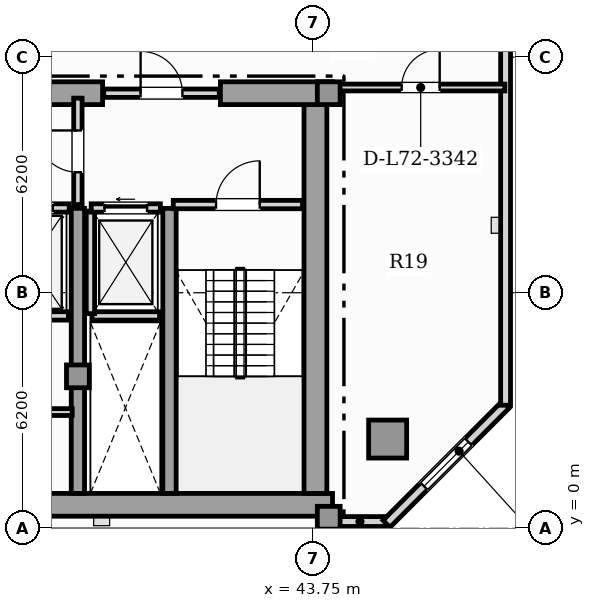
"""IFC4 building model, lengths in metres.
Left out: names, types, materials, properties, quantities, classifications, styles, units other than length and angle.
Written with IfcOpenShell. Run it as: python <this file> out.ifc"""

import sys

from ifc_helpers import new_model, si_unit, direction, frame, frame_2d, origin, origin_2d, place, context, subcontext, project, spatial, rectangle, hollow_rectangle, extrude, element, fill, save


model = new_model("IFC4")
c1 = context("Model", 3, precision=1e-05, world=origin(), true_north=direction((0.0, 1.0)))
c2 = subcontext(c1, "Body", "Model", "MODEL_VIEW")
j1 = project(units=[si_unit("LENGTHUNIT", "METRE"), si_unit("PLANEANGLEUNIT", "RADIAN")], contexts=[c1])
p1 = place(None, origin())
s1 = spatial("IfcSite", under=j1, at=p1, CompositionType="ELEMENT")
p2 = place(p1, origin())
s2 = spatial("IfcBuilding", under=s1, at=p2, CompositionType="ELEMENT")
p3 = place(p2, frame((0.0, 0.0, 292.6)))
s3 = spatial("IfcBuildingStorey", under=s2, at=p3, CompositionType="ELEMENT", Elevation=292.6)
p4 = place(p3, frame((13.25, 0.62, 0.0), z_axis=(0.0, 0.0, 1.0), x_axis=(1.0, 0.0, 0.0)))
e1 = element("IfcWall", 1, at=p4, inside=s3, PredefinedType="SHEAR", context=c2, shape_type="SweptSolid", body=[
    extrude(rectangle(XDim=31.0, YDim=0.6, at=frame_2d((15.5, 0.0))), origin(), (0.0, 0.0, 1.0), 3.65),
])
p5 = place(p3, frame((43.8, 0.92, 0.0), z_axis=(0.0, 0.0, 1.0), x_axis=(0.0, 1.0, 0.0)))
e2 = element("IfcWall", 2, at=p5, inside=s3, PredefinedType="SHEAR", context=c2, shape_type="SweptSolid", body=[
    extrude(rectangle(XDim=10.53, YDim=0.6, at=frame_2d((5.265, 0.0))), origin(), (0.0, 0.0, 1.0), 3.65),
])
p6 = place(p3, frame((30.9, 11.45, 0.0), z_axis=(0.0, 0.0, 1.0), x_axis=(1.0, 0.0, 0.0)))
e3 = element("IfcWall", 3, at=p6, inside=s3, PredefinedType="SHEAR", context=c2, shape_type="SweptSolid", body=[
    extrude(rectangle(XDim=7.3, YDim=0.6, at=frame_2d((3.65, 0.0))), origin(), (0.0, 0.0, 1.0), 3.65),
])
p7 = place(p3, frame((41.3, 11.45, 0.0), z_axis=(0.0, 0.0, 1.0), x_axis=(1.0, 0.0, 0.0)))
e4 = element("IfcWall", 4, at=p7, inside=s3, PredefinedType="SHEAR", context=c2, shape_type="SweptSolid", body=[
    extrude(rectangle(XDim=2.95, YDim=0.6, at=frame_2d((1.475, 0.0))), origin(), (0.0, 0.0, 1.0), 3.65),
])
for number, where, z_axis, x_axis in (
    (5, (37.55, 0.92, 0.0), (0.0, 0.0, 1.0), (0.0, 1.0, 0.0)),
    (6, (39.96, 0.92, 0.0), (0.0, 0.0, 1.0), (0.0, 1.0, 0.0)),
):
    element("IfcWall", number, at=place(p3, frame(where, z_axis=z_axis, x_axis=x_axis)), inside=s3, PredefinedType="SHEAR", context=c2, shape_type="SweptSolid", body=[
        extrude(rectangle(XDim=7.5, YDim=0.35, at=frame_2d((3.75, 0.0))), origin(), (0.0, 0.0, 1.0), 3.65),
    ])
for number, where, z_axis, x_axis in (
    (7, (44.15, 0.28, 0.0), (0.0, 0.0, 1.0), (1.0, 0.0, 0.0)),
    (8, (44.15, 11.45, 0.0), (0.0, 0.0, 1.0), (1.0, 0.0, 0.0)),
    (9, (37.55, 4.0, 0.0), (0.0, 0.0, 1.0), (1.0, 0.0, 0.0)),
):
    element("IfcColumn", number, at=place(p3, frame(where, z_axis=z_axis, x_axis=x_axis)), inside=s3, PredefinedType="COLUMN", context=c2, shape_type="SweptSolid", body=[
        extrude(rectangle(XDim=0.6, YDim=0.6, at=origin_2d()), origin(), (0.0, 0.0, 1.0), 3.85),
    ])
p8 = place(p3, frame((45.7, 2.35, 0.0), z_axis=(0.0, 0.0, 1.0), x_axis=(1.0, 0.0, 0.0)))
e10 = element("IfcColumn", 10, at=p8, inside=s3, PredefinedType="USERDEFINED", context=c2, shape_type="SweptSolid", body=[
    extrude(hollow_rectangle(XDim=1.0, YDim=1.0, WallThickness=0.06, at=origin_2d()), origin(), (0.0, 0.0, 1.0), 3.85),
])
p9 = place(p3, frame((44.25, 0.18, 0.0), z_axis=(0.0, 0.0, 1.0), x_axis=(1.0, 0.0, 0.0)))
e11 = element("IfcWall", 11, at=p9, inside=s3, PredefinedType="SOLIDWALL", context=c2, shape_type="SweptSolid", body=[
    extrude(rectangle(XDim=1.444, YDim=0.26, at=frame_2d((0.722, 0.0))), origin(), (0.0, 0.0, 1.0), 3.65),
])
p10 = place(p3, frame((45.67, 0.12, 0.0), z_axis=(0.0, 0.0, 1.0), x_axis=(0.707106781187, 0.707106781187, 0.0)))
e12 = element("IfcWall", 12, at=p10, inside=s3, PredefinedType="SOLIDWALL", context=c2, shape_type="SweptSolid", body=[
    extrude(rectangle(XDim=4.446, YDim=0.26, at=frame_2d((2.223, 0.0))), origin(), (0.0, 0.0, 1.0), 3.65),
])
p11 = place(p10, frame((1.398, 0.0, 0.88)))
e13 = element("IfcOpeningElement", 13, at=p11, cuts=e12, PredefinedType="OPENING", context=c2, shape_type="SweptSolid", body=[
    extrude(rectangle(XDim=1.65, YDim=2.0, at=frame_2d((0.825, 1.0))), frame((0.0, 0.14, 0.0), z_axis=(0.0, -1.0, 0.0), x_axis=(1.0, 0.0, 0.0)), (0.0, 0.0, 1.0), 0.28),
])
p12 = place(p3, frame((48.804, 3.24, 0.0), z_axis=(0.0, 0.0, 1.0), x_axis=(0.0, 1.0, 0.0)))
e14 = element("IfcWall", 14, at=p12, inside=s3, PredefinedType="SOLIDWALL", context=c2, shape_type="SweptSolid", body=[
    extrude(rectangle(XDim=13.478, YDim=0.26, at=frame_2d((6.739, 0.0))), origin(), (0.0, 0.0, 1.0), 3.65),
])
p13 = place(p12, frame((10.919, 0.0, 0.95)))
e15 = element("IfcOpeningElement", 15, at=p13, cuts=e14, PredefinedType="OPENING", context=c2, shape_type="SweptSolid", body=[
    extrude(rectangle(XDim=0.9, YDim=1.5, at=frame_2d((0.45, 0.75))), frame((0.0, 0.14, 0.0), z_axis=(0.0, -1.0, 0.0), x_axis=(1.0, 0.0, 0.0)), (0.0, 0.0, 1.0), 0.28),
])
p14 = place(p3, frame((37.92, 5.59, 0.0), z_axis=(0.0, 0.0, 1.0), x_axis=(1.0, 0.0, 0.0)))
e16 = element("IfcWall", 16, at=p14, inside=s3, PredefinedType="SOLIDWALL", context=c2, shape_type="SweptSolid", body=[
    extrude(rectangle(XDim=1.78, YDim=0.22, at=frame_2d((0.89, 0.0))), origin(), (0.0, 0.0, 1.0), 3.65),
])
p15 = place(p3, frame((37.88, 5.65, 0.0), z_axis=(0.0, 0.0, 1.0), x_axis=(0.0, 1.0, 0.0)))
e17 = element("IfcWall", 17, at=p15, inside=s3, PredefinedType="SOLIDWALL", context=c2, shape_type="SweptSolid", body=[
    extrude(rectangle(XDim=2.7, YDim=0.22, at=frame_2d((1.35, 0.0))), origin(), (0.0, 0.0, 1.0), 3.65),
])
p16 = place(p3, frame((37.9, 8.43, 0.0), z_axis=(0.0, 0.0, 1.0), x_axis=(1.0, 0.0, 0.0)))
e18 = element("IfcWall", 18, at=p16, inside=s3, PredefinedType="SOLIDWALL", context=c2, shape_type="SweptSolid", body=[
    extrude(rectangle(XDim=1.82, YDim=0.22, at=frame_2d((0.91, 0.0))), origin(), (0.0, 0.0, 1.0), 3.65),
])
p17 = place(p16, frame((0.35, 0.0, 0.0)))
e19 = element("IfcOpeningElement", 19, at=p17, cuts=e18, PredefinedType="OPENING", context=c2, shape_type="SweptSolid", body=[
    extrude(rectangle(XDim=1.12, YDim=2.25, at=frame_2d((0.56, 1.125))), frame((0.0, 0.12, 0.0), z_axis=(0.0, -1.0, 0.0), x_axis=(1.0, 0.0, 0.0)), (0.0, 0.0, 1.0), 0.24),
])
p18 = place(p3, frame((35.3, 5.59, 0.0), z_axis=(0.0, 0.0, 1.0), x_axis=(1.0, 0.0, 0.0)))
e20 = element("IfcWall", 20, at=p18, inside=s3, PredefinedType="SOLIDWALL", context=c2, shape_type="SweptSolid", body=[
    extrude(rectangle(XDim=2.0, YDim=0.22, at=frame_2d((1.0, 0.0))), origin(), (0.0, 0.0, 1.0), 3.65),
])
p19 = place(p3, frame((35.28, 8.43, 0.0), z_axis=(0.0, 0.0, 1.0), x_axis=(1.0, 0.0, 0.0)))
e21 = element("IfcWall", 21, at=p19, inside=s3, PredefinedType="SOLIDWALL", context=c2, shape_type="SweptSolid", body=[
    extrude(rectangle(XDim=2.04, YDim=0.22, at=frame_2d((1.02, 0.0))), origin(), (0.0, 0.0, 1.0), 3.65),
])
p20 = place(p19, frame((0.43, 0.0, 0.0)))
e22 = element("IfcOpeningElement", 22, at=p20, cuts=e21, PredefinedType="OPENING", context=c2, shape_type="SweptSolid", body=[
    extrude(rectangle(XDim=1.18, YDim=2.2, at=frame_2d((0.59, 1.1))), frame((0.0, 0.12, 0.0), z_axis=(0.0, -1.0, 0.0), x_axis=(1.0, 0.0, 0.0)), (0.0, 0.0, 1.0), 0.24),
])
p21 = place(p3, frame((40.06, 8.52, 0.0), z_axis=(0.0, 0.0, 1.0), x_axis=(1.0, 0.0, 0.0)))
e23 = element("IfcWall", 23, at=p21, inside=s3, PredefinedType="SOLIDWALL", context=c2, shape_type="SweptSolid", body=[
    extrude(rectangle(XDim=3.4, YDim=0.22, at=frame_2d((1.7, 0.0))), origin(), (0.0, 0.0, 1.0), 3.65),
])
p22 = place(p21, frame((1.125, 0.0, 0.0)))
e24 = element("IfcOpeningElement", 24, at=p22, cuts=e23, PredefinedType="OPENING", context=c2, shape_type="SweptSolid", body=[
    extrude(rectangle(XDim=1.15, YDim=2.2, at=frame_2d((0.575, 1.1))), frame((0.0, 0.12, 0.0), z_axis=(0.0, -1.0, 0.0), x_axis=(1.0, 0.0, 0.0)), (0.0, 0.0, 1.0), 0.24),
])
p23 = place(p3, frame((37.55, 8.52, 0.0), z_axis=(0.0, 0.0, 1.0), x_axis=(0.0, 1.0, 0.0)))
e25 = element("IfcWall", 25, at=p23, inside=s3, PredefinedType="SOLIDWALL", context=c2, shape_type="SweptSolid", body=[
    extrude(rectangle(XDim=2.8, YDim=0.22, at=frame_2d((1.4, 0.0))), origin(), (0.0, 0.0, 1.0), 3.105),
])
p24 = place(p23, frame((0.85, 0.0, 0.0)))
e26 = element("IfcOpeningElement", 26, at=p24, cuts=e25, PredefinedType="OPENING", context=c2, shape_type="SweptSolid", body=[
    extrude(rectangle(XDim=1.1, YDim=2.2, at=frame_2d((0.55, 1.1))), frame((0.0, 0.12, 0.0), z_axis=(0.0, -1.0, 0.0), x_axis=(1.0, 0.0, 0.0)), (0.0, 0.0, 1.0), 0.24),
])
p25 = place(p3, frame((38.23, 11.45, 0.0), z_axis=(0.0, 0.0, 1.0), x_axis=(1.0, 0.0, 0.0)))
e27 = element("IfcWall", 27, at=p25, inside=s3, PredefinedType="SOLIDWALL", context=c2, shape_type="SweptSolid", body=[
    extrude(rectangle(XDim=3.04, YDim=0.22, at=frame_2d((1.52, 0.0))), origin(), (0.0, 0.0, 1.0), 3.65),
])
p26 = place(p25, frame((0.97, 0.0, 0.0)))
e28 = element("IfcOpeningElement", 28, at=p26, cuts=e27, PredefinedType="OPENING", context=c2, shape_type="SweptSolid", body=[
    extrude(rectangle(XDim=1.1, YDim=2.2, at=frame_2d((0.55, 1.1))), frame((0.0, 0.12, 0.0), z_axis=(0.0, -1.0, 0.0), x_axis=(1.0, 0.0, 0.0)), (0.0, 0.0, 1.0), 0.24),
])
p27 = place(p3, frame((32.22, 3.06, 0.0), z_axis=(0.0, 0.0, 1.0), x_axis=(1.0, 0.0, 0.0)))
e29 = element("IfcWall", 29, at=p27, inside=s3, PredefinedType="PARTITIONING", context=c2, shape_type="SweptSolid", body=[
    extrude(rectangle(XDim=5.18, YDim=0.18, at=frame_2d((2.59, 0.0))), origin(), (0.0, 0.0, 1.0), 3.65),
])
p28 = place(p3, frame((44.355, 11.6, 0.0), z_axis=(0.0, 0.0, 1.0), x_axis=(1.0, 0.0, 0.0)))
e30 = element("IfcWall", 30, at=p28, inside=s3, PredefinedType="PARTITIONING", context=c2, shape_type="SweptSolid", body=[
    extrude(rectangle(XDim=4.429, YDim=0.18, at=frame_2d((2.215, 0.0))), origin(), (0.0, 0.0, 1.0), 3.65),
])
p29 = place(p28, frame((1.715, 0.0, 0.0)))
e31 = element("IfcOpeningElement", 31, at=p29, cuts=e30, PredefinedType="OPENING", context=c2, shape_type="SweptSolid", body=[
    extrude(rectangle(XDim=1.0, YDim=2.15, at=frame_2d((0.5, 1.075))), frame((0.0, 0.1, 0.0), z_axis=(0.0, -1.0, 0.0), x_axis=(1.0, 0.0, 0.0)), (0.0, 0.0, 1.0), 0.2),
])
p30 = place(p11, origin())
e32 = element("IfcWindow", 32, at=p30, inside=s3, PartitioningType="SINGLE_PANEL", PredefinedType="WINDOW", context=c2, shape_type="SweptSolid", body=[
    extrude(rectangle(XDim=1.65, YDim=2.0, at=frame_2d((0.825, 1.0))), frame((0.0, 0.03, 0.0), z_axis=(0.0, -1.0, 0.0), x_axis=(1.0, 0.0, 0.0)), (0.0, 0.0, 1.0), 0.06),
])
fill(e13, e32)
p31 = place(p17, origin())
e33 = element("IfcDoor", 33, at=p31, inside=s3, OperationType="SLIDING_TO_LEFT", PredefinedType="DOOR", context=c2, shape_type="SweptSolid", body=[
    extrude(rectangle(XDim=1.12, YDim=2.25, at=frame_2d((0.56, 1.125))), frame((0.0, 0.025, 0.0), z_axis=(0.0, -1.0, 0.0), x_axis=(1.0, 0.0, 0.0)), (0.0, 0.0, 1.0), 0.05),
])
fill(e19, e33)
p32 = place(p20, origin())
e34 = element("IfcDoor", 34, at=p32, inside=s3, OperationType="SLIDING_TO_RIGHT", PredefinedType="DOOR", context=c2, shape_type="SweptSolid", body=[
    extrude(rectangle(XDim=1.18, YDim=2.2, at=frame_2d((0.59, 1.1))), frame((0.0, 0.025, 0.0), z_axis=(0.0, -1.0, 0.0), x_axis=(1.0, 0.0, 0.0)), (0.0, 0.0, 1.0), 0.05),
])
fill(e22, e34)
p33 = place(p22, origin())
e35 = element("IfcDoor", 35, at=p33, inside=s3, OperationType="SINGLE_SWING_RIGHT", PredefinedType="DOOR", context=c2, shape_type="SweptSolid", body=[
    extrude(rectangle(XDim=1.15, YDim=2.2, at=frame_2d((0.575, 1.1))), frame((0.0, 0.025, 0.0), z_axis=(0.0, -1.0, 0.0), x_axis=(1.0, 0.0, 0.0)), (0.0, 0.0, 1.0), 0.05),
])
fill(e24, e35)
p34 = place(p24, origin())
e36 = element("IfcDoor", 36, at=p34, inside=s3, OperationType="SINGLE_SWING_RIGHT", PredefinedType="DOOR", context=c2, shape_type="SweptSolid", body=[
    extrude(rectangle(XDim=1.1, YDim=2.2, at=frame_2d((0.55, 1.1))), frame((0.0, 0.025, 0.0), z_axis=(0.0, -1.0, 0.0), x_axis=(1.0, 0.0, 0.0)), (0.0, 0.0, 1.0), 0.05),
])
fill(e26, e36)
p35 = place(p26, origin())
e37 = element("IfcDoor", 37, at=p35, inside=s3, OperationType="SINGLE_SWING_LEFT", PredefinedType="DOOR", context=c2, shape_type="SweptSolid", body=[
    extrude(rectangle(XDim=1.1, YDim=2.2, at=frame_2d((0.55, 1.1))), frame((0.0, 0.025, 0.0), z_axis=(0.0, -1.0, 0.0), x_axis=(1.0, 0.0, 0.0)), (0.0, 0.0, 1.0), 0.05),
])
fill(e28, e37)
p36 = place(p29, origin())
e38 = element("IfcDoor", 38, at=p36, inside=s3, OperationType="SINGLE_SWING_RIGHT", PredefinedType="DOOR", context=c2, shape_type="SweptSolid", body=[
    extrude(rectangle(XDim=1.0, YDim=2.15, at=frame_2d((0.5, 1.075))), frame((0.0, 0.025, 0.0), z_axis=(0.0, -1.0, 0.0), x_axis=(1.0, 0.0, 0.0)), (0.0, 0.0, 1.0), 0.05),
])
fill(e31, e38)
save(model, sys.argv[1])
